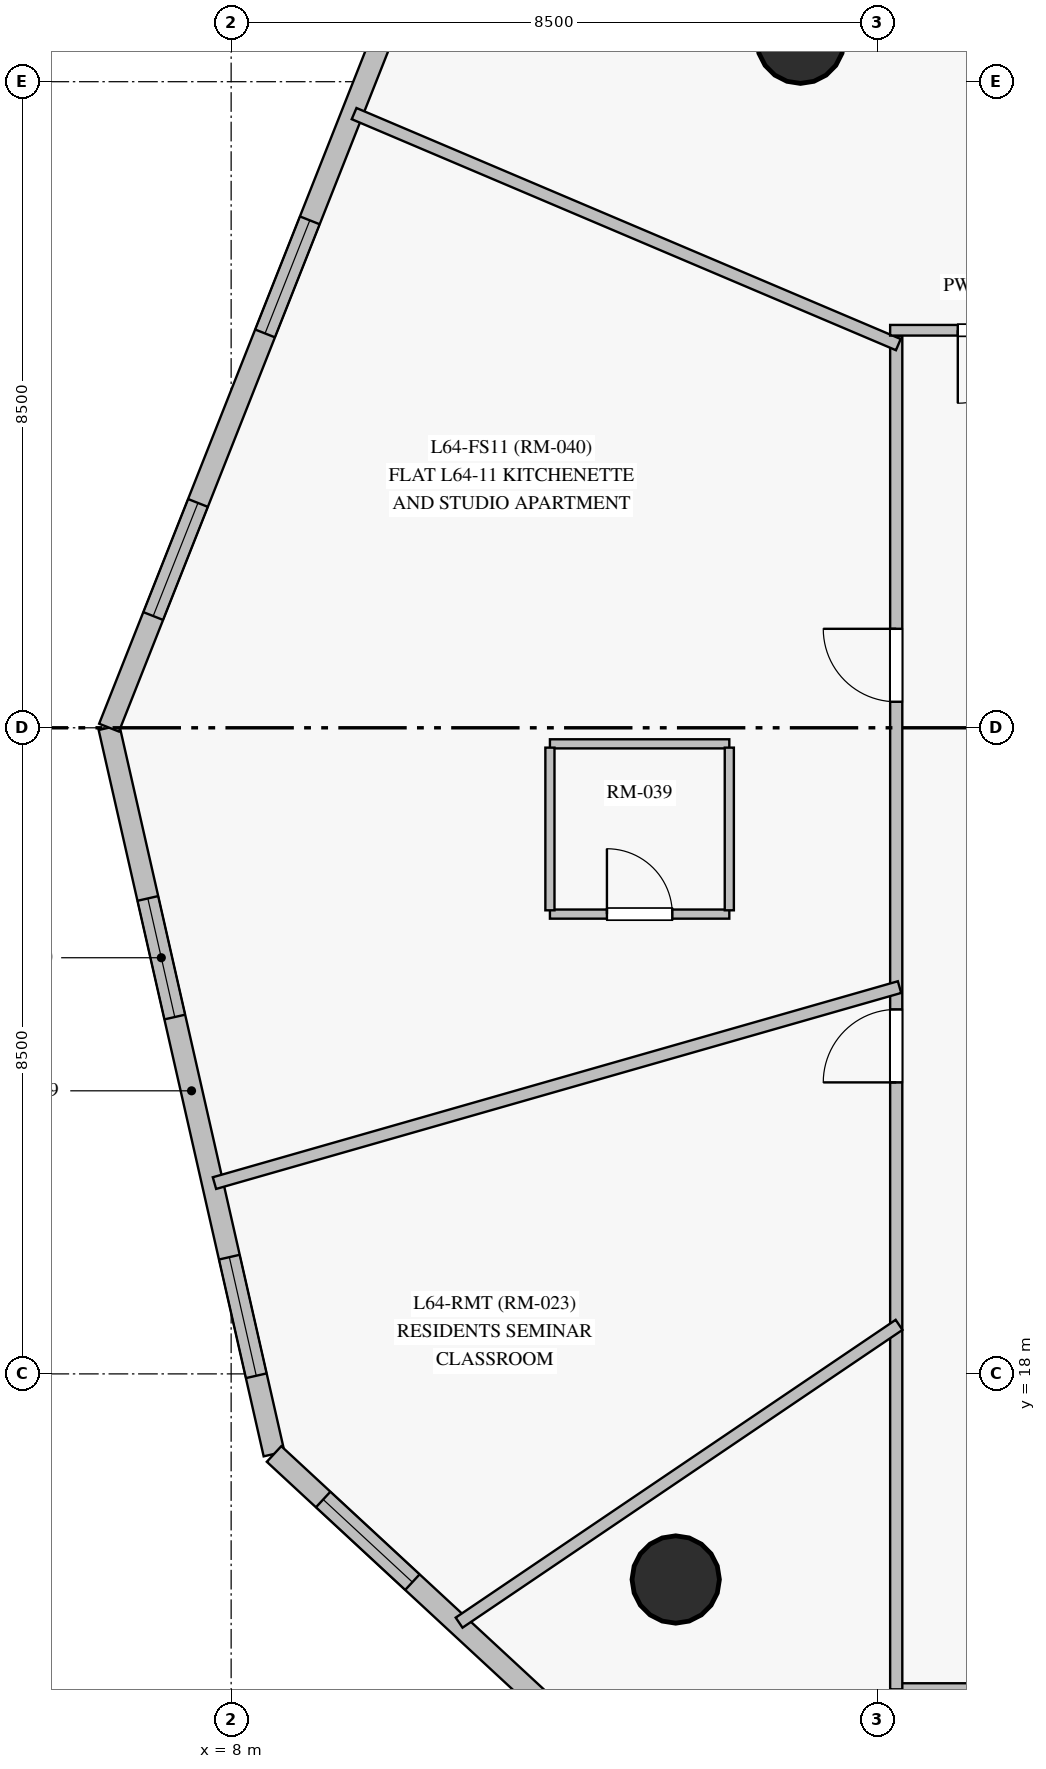
"""IFC4 building model, lengths in metres.
Left out: names, types, materials, properties, quantities, classifications, styles, units other than length and angle.
Written with IfcOpenShell. Run it as: python <this file> out.ifc"""

import sys

from ifc_helpers import new_model, si_unit, direction, frame, frame_2d, origin, origin_with_axes, origin_2d, place, context, subcontext, project, spatial, rectangle, circle, extrude, source, transform, mapped, element, fill, save


model = new_model("IFC4")
c1 = context("Model", 3, precision=1e-05, world=origin(), true_north=direction((0.0, 1.0)))
c2 = subcontext(c1, "Body", "Model", "MODEL_VIEW")
j1 = project(units=[si_unit("LENGTHUNIT", "METRE"), si_unit("PLANEANGLEUNIT", "RADIAN")], contexts=[c1])
p1 = place(None, origin())
s1 = spatial("IfcSite", under=j1, at=p1, CompositionType="ELEMENT")
p2 = place(p1, origin())
s2 = spatial("IfcBuilding", under=s1, at=p2, CompositionType="ELEMENT")
p3 = place(p2, frame((0.0, 0.0, 219.95)))
s3 = spatial("IfcBuildingStorey", under=s2, at=p3, CompositionType="ELEMENT", Elevation=219.95)
m1 = source(origin_with_axes(), c2, "Body", "SweptSolid", [
    extrude(circle(Radius=0.575, at=origin_2d()), origin(), (0.0, 0.0, 1.0), 3.05),
])
for number, where, z_axis, x_axis in (
    (1, (15.49, 35.552, 0.0), (0.0, 0.0, 1.0), (1.0, 0.0, 0.0)),
    (2, (13.849, 15.295, 0.0), (0.0, 0.0, 1.0), (1.0, 0.0, 0.0)),
):
    element("IfcColumn", number, at=place(p3, frame(where, z_axis=z_axis, x_axis=x_axis)), inside=s3, PredefinedType="COLUMN", context=c2, shape_type="MappedRepresentation", body=[
        mapped(m1, transform((0.0, 0.0, 0.0), scale=1.0)),
    ])
p4 = place(p3, frame((6.394, 26.502, 0.0), z_axis=(0.0, 0.0, 1.0), x_axis=(0.221539262032, -0.975151452534, 0.0)))
e3 = element("IfcWall", 3, at=p4, inside=s3, PredefinedType="SOLIDWALL", context=c2, shape_type="SweptSolid", body=[
    extrude(rectangle(XDim=9.799, YDim=0.28, at=frame_2d((4.899, 0.0))), origin(), (0.0, 0.0, 1.0), 2.85),
])
p5 = place(p4, frame((2.304, 0.0, 0.85)))
e4 = element("IfcOpeningElement", 4, at=p5, cuts=e3, PredefinedType="OPENING", context=c2, shape_type="SweptSolid", body=[
    extrude(rectangle(XDim=1.6, YDim=1.6, at=frame_2d((0.8, 0.8))), frame((0.0, 0.15, 0.0), z_axis=(0.0, -1.0, 0.0), x_axis=(1.0, 0.0, 0.0)), (0.0, 0.0, 1.0), 0.3),
])
p6 = place(p4, frame((7.144, 0.0, 0.85)))
e5 = element("IfcOpeningElement", 5, at=p6, cuts=e3, PredefinedType="OPENING", context=c2, shape_type="SweptSolid", body=[
    extrude(rectangle(XDim=1.6, YDim=1.6, at=frame_2d((0.8, 0.8))), frame((0.0, 0.15, 0.0), z_axis=(0.0, -1.0, 0.0), x_axis=(1.0, 0.0, 0.0)), (0.0, 0.0, 1.0), 0.3),
])
p7 = place(p3, frame((8.564, 16.946, 0.0), z_axis=(0.0, 0.0, 1.0), x_axis=(0.733643128565, -0.679534958563, 0.0)))
e6 = element("IfcWall", 6, at=p7, inside=s3, PredefinedType="SOLIDWALL", context=c2, shape_type="SweptSolid", body=[
    extrude(rectangle(XDim=12.886, YDim=0.28, at=frame_2d((6.443, 0.0))), origin(), (0.0, 0.0, 1.0), 2.85),
])
p8 = place(p7, frame((0.881, 0.0, 0.85)))
e7 = element("IfcOpeningElement", 7, at=p8, cuts=e6, PredefinedType="OPENING", context=c2, shape_type="SweptSolid", body=[
    extrude(rectangle(XDim=1.6, YDim=1.6, at=frame_2d((0.8, 0.8))), frame((0.0, 0.15, 0.0), z_axis=(0.0, -1.0, 0.0), x_axis=(1.0, 0.0, 0.0)), (0.0, 0.0, 1.0), 0.3),
])
p9 = place(p7, frame((5.043, 0.0, 0.85)))
e8 = element("IfcOpeningElement", 8, at=p9, cuts=e6, PredefinedType="OPENING", context=c2, shape_type="SweptSolid", body=[
    extrude(rectangle(XDim=1.6, YDim=1.6, at=frame_2d((0.8, 0.8))), frame((0.0, 0.15, 0.0), z_axis=(0.0, -1.0, 0.0), x_axis=(1.0, 0.0, 0.0)), (0.0, 0.0, 1.0), 0.3),
])
p10 = place(p7, frame((9.485, 0.0, 0.85)))
e9 = element("IfcOpeningElement", 9, at=p10, cuts=e6, PredefinedType="OPENING", context=c2, shape_type="SweptSolid", body=[
    extrude(rectangle(XDim=1.6, YDim=1.6, at=frame_2d((0.8, 0.8))), frame((0.0, 0.15, 0.0), z_axis=(0.0, -1.0, 0.0), x_axis=(1.0, 0.0, 0.0)), (0.0, 0.0, 1.0), 0.3),
])
p11 = place(p3, frame((11.136, 38.484, 0.0), z_axis=(0.0, 0.0, 1.0), x_axis=(-0.367997606819, -0.929826737288, 0.0)))
e10 = element("IfcWall", 10, at=p11, inside=s3, PredefinedType="SOLIDWALL", context=c2, shape_type="SweptSolid", body=[
    extrude(rectangle(XDim=12.886, YDim=0.28, at=frame_2d((6.443, 0.0))), origin(), (0.0, 0.0, 1.0), 2.85),
])
p12 = place(p11, frame((1.325, 0.0, 0.85)))
e11 = element("IfcOpeningElement", 11, at=p12, cuts=e10, PredefinedType="OPENING", context=c2, shape_type="SweptSolid", body=[
    extrude(rectangle(XDim=1.6, YDim=1.6, at=frame_2d((0.8, 0.8))), frame((0.0, 0.15, 0.0), z_axis=(0.0, -1.0, 0.0), x_axis=(1.0, 0.0, 0.0)), (0.0, 0.0, 1.0), 0.3),
])
p13 = place(p11, frame((5.709, 0.0, 0.85)))
e12 = element("IfcOpeningElement", 12, at=p13, cuts=e10, PredefinedType="OPENING", context=c2, shape_type="SweptSolid", body=[
    extrude(rectangle(XDim=1.6, YDim=1.6, at=frame_2d((0.8, 0.8))), frame((0.0, 0.15, 0.0), z_axis=(0.0, -1.0, 0.0), x_axis=(1.0, 0.0, 0.0)), (0.0, 0.0, 1.0), 0.3),
])
p14 = place(p11, frame((9.707, 0.0, 0.85)))
e13 = element("IfcOpeningElement", 13, at=p14, cuts=e10, PredefinedType="OPENING", context=c2, shape_type="SweptSolid", body=[
    extrude(rectangle(XDim=1.6, YDim=1.6, at=frame_2d((0.8, 0.8))), frame((0.0, 0.15, 0.0), z_axis=(0.0, -1.0, 0.0), x_axis=(1.0, 0.0, 0.0)), (0.0, 0.0, 1.0), 0.3),
])
p15 = place(p3, frame((41.8, 13.85, 0.0), z_axis=(0.0, 0.0, 1.0), x_axis=(-1.0, 0.0, 0.0)))
e14 = element("IfcWall", 14, at=p15, inside=s3, PredefinedType="PARTITIONING", context=c2, shape_type="SweptSolid", body=[
    extrude(rectangle(XDim=25.05, YDim=0.16, at=frame_2d((12.525, 0.0))), origin(), (0.0, 0.0, 1.0), 2.3),
])
p16 = place(p15, frame((22.03, 0.0, 0.0)))
e15 = element("IfcOpeningElement", 15, at=p16, cuts=e14, PredefinedType="OPENING", context=c2, shape_type="SweptSolid", body=[
    extrude(rectangle(XDim=0.96, YDim=2.15, at=frame_2d((0.48, 1.075))), frame((0.0, 0.09, 0.0), z_axis=(0.0, -1.0, 0.0), x_axis=(1.0, 0.0, 0.0)), (0.0, 0.0, 1.0), 0.18),
])
p17 = place(p15, frame((15.808, 0.0, 0.0)))
e16 = element("IfcOpeningElement", 16, at=p17, cuts=e14, PredefinedType="OPENING", context=c2, shape_type="SweptSolid", body=[
    extrude(rectangle(XDim=0.96, YDim=2.15, at=frame_2d((0.48, 1.075))), frame((0.0, 0.09, 0.0), z_axis=(0.0, -1.0, 0.0), x_axis=(1.0, 0.0, 0.0)), (0.0, 0.0, 1.0), 0.18),
])
p18 = place(p15, frame((12.05, 0.0, 0.0)))
e17 = element("IfcOpeningElement", 17, at=p18, cuts=e14, PredefinedType="OPENING", context=c2, shape_type="SweptSolid", body=[
    extrude(rectangle(XDim=0.96, YDim=2.15, at=frame_2d((0.48, 1.075))), frame((0.0, 0.09, 0.0), z_axis=(0.0, -1.0, 0.0), x_axis=(1.0, 0.0, 0.0)), (0.0, 0.0, 1.0), 0.18),
])
p19 = place(p15, frame((8.292, 0.0, 0.0)))
e18 = element("IfcOpeningElement", 18, at=p19, cuts=e14, PredefinedType="OPENING", context=c2, shape_type="SweptSolid", body=[
    extrude(rectangle(XDim=0.96, YDim=2.15, at=frame_2d((0.48, 1.075))), frame((0.0, 0.09, 0.0), z_axis=(0.0, -1.0, 0.0), x_axis=(1.0, 0.0, 0.0)), (0.0, 0.0, 1.0), 0.18),
])
p20 = place(p15, frame((3.184, 0.0, 0.0)))
e19 = element("IfcOpeningElement", 19, at=p20, cuts=e14, PredefinedType="OPENING", context=c2, shape_type="SweptSolid", body=[
    extrude(rectangle(XDim=0.86, YDim=2.04, at=frame_2d((0.43, 1.02))), frame((0.0, 0.09, 0.0), z_axis=(0.0, -1.0, 0.0), x_axis=(1.0, 0.0, 0.0)), (0.0, 0.0, 1.0), 0.18),
])
p21 = place(p3, frame((16.75, 13.85, 0.0), z_axis=(0.0, 0.0, 1.0), x_axis=(0.0, 1.0, 0.0)))
e20 = element("IfcWall", 20, at=p21, inside=s3, PredefinedType="PARTITIONING", context=c2, shape_type="SweptSolid", body=[
    extrude(rectangle(XDim=17.8, YDim=0.16, at=frame_2d((8.9, 0.0))), origin(), (0.0, 0.0, 1.0), 2.45),
])
p22 = place(p21, frame((12.992, 0.0, 0.0)))
e21 = element("IfcOpeningElement", 21, at=p22, cuts=e20, PredefinedType="OPENING", context=c2, shape_type="SweptSolid", body=[
    extrude(rectangle(XDim=0.96, YDim=2.15, at=frame_2d((0.48, 1.075))), frame((0.0, 0.09, 0.0), z_axis=(0.0, -1.0, 0.0), x_axis=(1.0, 0.0, 0.0)), (0.0, 0.0, 1.0), 0.18),
])
p23 = place(p21, frame((7.985, 0.0, 0.0)))
e22 = element("IfcOpeningElement", 22, at=p23, cuts=e20, PredefinedType="OPENING", context=c2, shape_type="SweptSolid", body=[
    extrude(rectangle(XDim=0.96, YDim=2.15, at=frame_2d((0.48, 1.075))), frame((0.0, 0.09, 0.0), z_axis=(0.0, -1.0, 0.0), x_axis=(1.0, 0.0, 0.0)), (0.0, 0.0, 1.0), 0.18),
])
p24 = place(p3, frame((7.781, 20.51, 0.0), z_axis=(0.0, 0.0, 1.0), x_axis=(0.961423640537, 0.275071960433, 0.0)))
e23 = element("IfcWall", 23, at=p24, inside=s3, PredefinedType="PARTITIONING", context=c2, shape_type="SweptSolid", body=[
    extrude(rectangle(XDim=9.374, YDim=0.16, at=frame_2d((4.687, 0.0))), origin(), (0.0, 0.0, 1.0), 2.85),
])
p25 = place(p3, frame((16.778, 31.541, 0.0), z_axis=(0.0, 0.0, 1.0), x_axis=(-0.920500032192, 0.390742486472, 0.0)))
e24 = element("IfcWall", 24, at=p25, inside=s3, PredefinedType="PARTITIONING", context=c2, shape_type="SweptSolid", body=[
    extrude(rectangle(XDim=7.778, YDim=0.16, at=frame_2d((3.889, 0.0))), origin(), (0.0, 0.0, 1.0), 2.85),
])
p26 = place(p3, frame((16.787, 18.645, 0.0), z_axis=(0.0, 0.0, 1.0), x_axis=(-0.828133669323, -0.560530664401, 0.0)))
e25 = element("IfcWall", 25, at=p26, inside=s3, PredefinedType="PARTITIONING", context=c2, shape_type="SweptSolid", body=[
    extrude(rectangle(XDim=6.989, YDim=0.16, at=frame_2d((3.495, 0.0))), origin(), (0.0, 0.0, 1.0), 2.85),
])
p27 = place(p3, frame((19.42, 31.73, 0.0), z_axis=(0.0, 0.0, 1.0), x_axis=(-1.0, 0.0, 0.0)))
e26 = element("IfcWall", 26, at=p27, inside=s3, PredefinedType="PARTITIONING", context=c2, shape_type="SweptSolid", body=[
    extrude(rectangle(XDim=2.75, YDim=0.14, at=frame_2d((1.375, 0.0))), origin(), (0.0, 0.0, 1.0), 2.85),
])
p28 = place(p27, frame((0.9, 0.0, 0.0)))
e27 = element("IfcOpeningElement", 27, at=p28, cuts=e26, PredefinedType="OPENING", context=c2, shape_type="SweptSolid", body=[
    extrude(rectangle(XDim=0.96, YDim=2.15, at=frame_2d((0.48, 1.075))), frame((0.0, 0.08, 0.0), z_axis=(0.0, -1.0, 0.0), x_axis=(1.0, 0.0, 0.0)), (0.0, 0.0, 1.0), 0.16),
])
p29 = place(p3, frame((12.194, 24.049, 0.0), z_axis=(0.0, 0.0, 1.0), x_axis=(1.0, 0.0, 0.0)))
e28 = element("IfcWall", 28, at=p29, inside=s3, PredefinedType="PARTITIONING", context=c2, shape_type="SweptSolid", body=[
    extrude(rectangle(XDim=2.36, YDim=0.12, at=frame_2d((1.18, 0.0))), origin(), (0.0, 0.0, 1.0), 2.85),
])
p30 = place(p29, frame((0.75, 0.0, 0.0)))
e29 = element("IfcOpeningElement", 29, at=p30, cuts=e28, PredefinedType="OPENING", context=c2, shape_type="SweptSolid", body=[
    extrude(rectangle(XDim=0.86, YDim=2.1, at=frame_2d((0.43, 1.05))), frame((0.0, 0.07, 0.0), z_axis=(0.0, -1.0, 0.0), x_axis=(1.0, 0.0, 0.0)), (0.0, 0.0, 1.0), 0.14),
])
p31 = place(p3, frame((14.554, 26.289, 0.0), z_axis=(0.0, 0.0, 1.0), x_axis=(-1.0, 0.0, 0.0)))
e30 = element("IfcWall", 30, at=p31, inside=s3, PredefinedType="PARTITIONING", context=c2, shape_type="SweptSolid", body=[
    extrude(rectangle(XDim=2.36, YDim=0.12, at=frame_2d((1.18, 0.0))), origin(), (0.0, 0.0, 1.0), 2.85),
])
p32 = place(p3, frame((14.554, 24.099, 0.0), z_axis=(0.0, 0.0, 1.0), x_axis=(0.0, 1.0, 0.0)))
e31 = element("IfcWall", 31, at=p32, inside=s3, PredefinedType="PARTITIONING", context=c2, shape_type="SweptSolid", body=[
    extrude(rectangle(XDim=2.14, YDim=0.12, at=frame_2d((1.07, 0.0))), origin(), (0.0, 0.0, 1.0), 2.3),
])
p33 = place(p3, frame((12.194, 26.239, 0.0), z_axis=(0.0, 0.0, 1.0), x_axis=(0.0, -1.0, 0.0)))
e32 = element("IfcWall", 32, at=p33, inside=s3, PredefinedType="PARTITIONING", context=c2, shape_type="SweptSolid", body=[
    extrude(rectangle(XDim=2.14, YDim=0.12, at=frame_2d((1.07, 0.0))), origin(), (0.0, 0.0, 1.0), 2.85),
])
m2 = source(origin_with_axes(), c2, "Body", "SweptSolid", [
    extrude(rectangle(XDim=1.6, YDim=1.6, at=frame_2d((0.8, 0.8))), frame((0.0, 0.03, 0.0), z_axis=(0.0, -1.0, 0.0), x_axis=(1.0, 0.0, 0.0)), (0.0, 0.0, 1.0), 0.06),
])
p34 = place(p5, origin())
e33 = element("IfcWindow", 33, at=p34, inside=s3, PartitioningType="SINGLE_PANEL", PredefinedType="WINDOW", context=c2, shape_type="MappedRepresentation", body=[
    mapped(m2, transform((0.0, 0.0, 0.0), scale=1.0)),
])
fill(e4, e33)
p35 = place(p6, origin())
e34 = element("IfcWindow", 34, at=p35, inside=s3, PartitioningType="SINGLE_PANEL", PredefinedType="WINDOW", context=c2, shape_type="MappedRepresentation", body=[
    mapped(m2, transform((0.0, 0.0, 0.0), scale=1.0)),
])
fill(e5, e34)
p36 = place(p8, origin())
e35 = element("IfcWindow", 35, at=p36, inside=s3, PartitioningType="SINGLE_PANEL", PredefinedType="WINDOW", context=c2, shape_type="MappedRepresentation", body=[
    mapped(m2, transform((0.0, 0.0, 0.0), scale=1.0)),
])
fill(e7, e35)
p37 = place(p13, origin())
e36 = element("IfcWindow", 36, at=p37, inside=s3, PartitioningType="SINGLE_PANEL", PredefinedType="WINDOW", context=c2, shape_type="MappedRepresentation", body=[
    mapped(m2, transform((0.0, 0.0, 0.0), scale=1.0)),
])
fill(e12, e36)
p38 = place(p14, origin())
e37 = element("IfcWindow", 37, at=p38, inside=s3, PartitioningType="SINGLE_PANEL", PredefinedType="WINDOW", context=c2, shape_type="MappedRepresentation", body=[
    mapped(m2, transform((0.0, 0.0, 0.0), scale=1.0)),
])
fill(e13, e37)
m3 = source(origin_with_axes(), c2, "Body", "SweptSolid", [
    extrude(rectangle(XDim=0.96, YDim=2.15, at=frame_2d((0.48, 1.075))), frame((0.0, 0.025, 0.0), z_axis=(0.0, -1.0, 0.0), x_axis=(1.0, 0.0, 0.0)), (0.0, 0.0, 1.0), 0.05),
])
p39 = place(p28, origin())
e38 = element("IfcDoor", 38, at=p39, inside=s3, OperationType="SINGLE_SWING_RIGHT", PredefinedType="DOOR", context=c2, shape_type="MappedRepresentation", body=[
    mapped(m3, transform((0.0, 0.0, 0.0), scale=1.0)),
])
fill(e27, e38)
m4 = source(origin_with_axes(), c2, "Body", "SweptSolid", [
    extrude(rectangle(XDim=0.86, YDim=2.1, at=frame_2d((0.43, 1.05))), frame((0.0, 0.025, 0.0), z_axis=(0.0, -1.0, 0.0), x_axis=(1.0, 0.0, 0.0)), (0.0, 0.0, 1.0), 0.05),
])
p40 = place(p30, origin())
e39 = element("IfcDoor", 39, at=p40, inside=s3, OperationType="SINGLE_SWING_LEFT", PredefinedType="DOOR", context=c2, shape_type="MappedRepresentation", body=[
    mapped(m4, transform((0.0, 0.0, 0.0), scale=1.0)),
])
fill(e29, e39)
p41 = place(p22, origin())
e40 = element("IfcDoor", 40, at=p41, inside=s3, OperationType="SINGLE_SWING_RIGHT", PredefinedType="DOOR", context=c2, shape_type="MappedRepresentation", body=[
    mapped(m3, transform((0.0, 0.0, 0.0), scale=1.0)),
])
fill(e21, e40)
p42 = place(p23, origin())
e41 = element("IfcDoor", 41, at=p42, inside=s3, OperationType="SINGLE_SWING_LEFT", PredefinedType="DOOR", context=c2, shape_type="MappedRepresentation", body=[
    mapped(m3, transform((0.0, 0.0, 0.0), scale=1.0)),
])
fill(e22, e41)
save(model, sys.argv[1])
